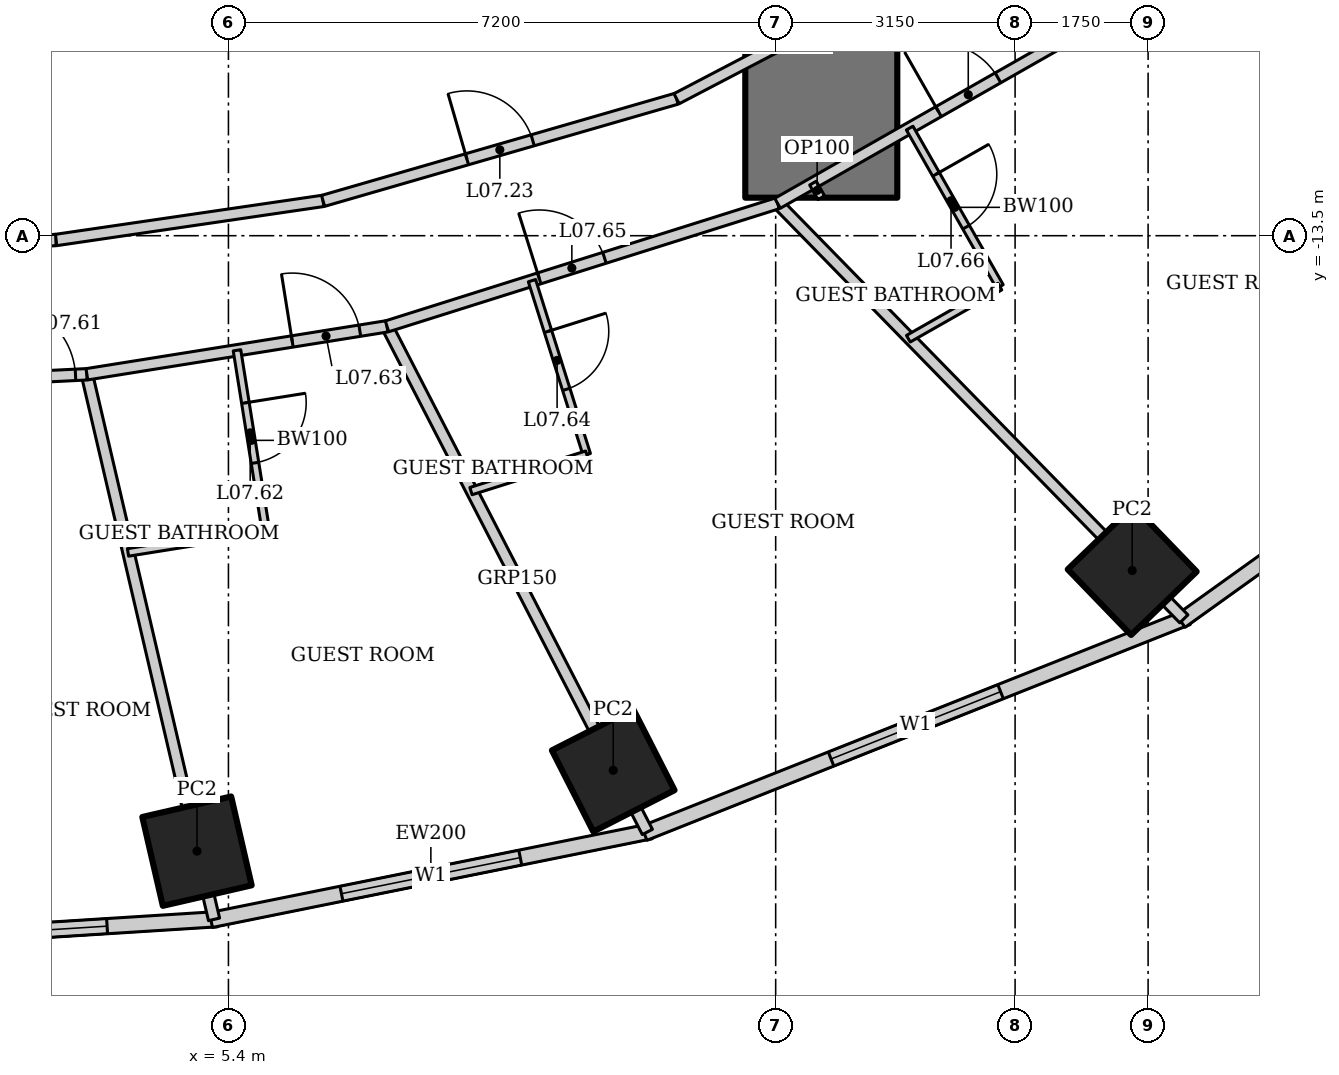
"""IFC4 building model, lengths in metres.
Left out: names, types, materials, properties, quantities, classifications, styles, units other than length and angle.
Written with IfcOpenShell. Run it as: python <this file> out.ifc"""

import sys

from ifc_helpers import new_model, si_unit, direction, frame, frame_2d, origin, origin_2d, place, context, subcontext, project, spatial, rectangle, hollow_rectangle, extrude, element, fill, save


model = new_model("IFC4")
c1 = context("Model", 3, precision=1e-05, world=origin(), true_north=direction((0.0, 1.0)))
c2 = subcontext(c1, "Body", "Model", "MODEL_VIEW")
j1 = project(units=[si_unit("LENGTHUNIT", "METRE"), si_unit("PLANEANGLEUNIT", "RADIAN")], contexts=[c1])
p1 = place(None, origin())
s1 = spatial("IfcSite", under=j1, at=p1, CompositionType="ELEMENT")
p2 = place(p1, origin())
s2 = spatial("IfcBuilding", under=s1, at=p2, CompositionType="ELEMENT")
p3 = place(p2, frame((0.0, 0.0, 40.6)))
s3 = spatial("IfcBuildingStorey", under=s2, at=p3, CompositionType="ELEMENT", Elevation=40.6)
for number, where, z_axis, x_axis in (
    (1, (4.986, -21.598, 0.0), (0.0, 0.0, 1.0), (0.974, 0.225, 0.0)),
    (2, (10.463, -20.534, 0.0), (0.0, 0.0, 1.0), (0.891, 0.454, 0.0)),
    (3, (17.291, -17.905, 0.0), (0.0, 0.0, 1.0), (0.719, 0.695, 0.0)),
):
    element("IfcColumn", number, at=place(p3, frame(where, z_axis=z_axis, x_axis=x_axis)), inside=s3, PredefinedType="COLUMN", context=c2, shape_type="SweptSolid", body=[
        extrude(hollow_rectangle(XDim=1.2, YDim=1.2, WallThickness=0.1, at=origin_2d()), origin(), (0.0, 0.0, 1.0), 3.6),
    ])
p4 = place(p3, frame((13.2, -13.0, 0.0), z_axis=(0.0, 0.0, 1.0), x_axis=(0.0, 1.0, 0.0)))
e4 = element("IfcWall", 4, at=p4, inside=s3, PredefinedType="SHEAR", context=c2, shape_type="SweptSolid", body=[
    extrude(rectangle(XDim=26.0, YDim=2.0, at=frame_2d((13.0, 0.0))), origin(), (0.0, 0.0, 1.0), 3.6),
])
p5 = place(p4, frame((12.1, 0.0, 0.0)))
e5 = element("IfcOpeningElement", 5, at=p5, cuts=e4, PredefinedType="OPENING", context=c2, shape_type="SweptSolid", body=[
    extrude(rectangle(XDim=1.8, YDim=2.1, at=frame_2d((0.9, 1.05))), frame((0.0, 1.01, 0.0), z_axis=(0.0, -1.0, 0.0), x_axis=(1.0, 0.0, 0.0)), (0.0, 0.0, 1.0), 2.02),
])
p6 = place(p3, frame((-0.041, -22.827, 0.0), z_axis=(0.0, 0.0, 1.0), x_axis=(0.998018582375, 0.062919863585, 0.0)))
e6 = element("IfcWall", 6, at=p6, inside=s3, PredefinedType="SOLIDWALL", context=c2, shape_type="SweptSolid", body=[
    extrude(rectangle(XDim=5.304, YDim=0.2, at=frame_2d((2.652, 0.0))), origin(), (0.0, 0.0, 1.0), 3.45),
])
p7 = place(p6, frame((1.452, 0.0, 0.5)))
e7 = element("IfcOpeningElement", 7, at=p7, cuts=e6, PredefinedType="OPENING", context=c2, shape_type="SweptSolid", body=[
    extrude(rectangle(XDim=2.4, YDim=2.2, at=frame_2d((1.2, 1.1))), frame((0.0, 0.11, 0.0), z_axis=(0.0, -1.0, 0.0), x_axis=(1.0, 0.0, 0.0)), (0.0, 0.0, 1.0), 0.22),
])
p8 = place(p3, frame((5.17, -22.504, 0.0), z_axis=(0.0, 0.0, 1.0), x_axis=(0.980251657452, 0.197754110105, 0.0)))
e8 = element("IfcWall", 8, at=p8, inside=s3, PredefinedType="SOLIDWALL", context=c2, shape_type="SweptSolid", body=[
    extrude(rectangle(XDim=5.904, YDim=0.2, at=frame_2d((2.952, 0.0))), origin(), (0.0, 0.0, 1.0), 3.45),
])
p9 = place(p8, frame((1.752, 0.0, 0.5)))
e9 = element("IfcOpeningElement", 9, at=p9, cuts=e8, PredefinedType="OPENING", context=c2, shape_type="SweptSolid", body=[
    extrude(rectangle(XDim=2.4, YDim=2.2, at=frame_2d((1.2, 1.1))), frame((0.0, 0.11, 0.0), z_axis=(0.0, -1.0, 0.0), x_axis=(1.0, 0.0, 0.0)), (0.0, 0.0, 1.0), 0.22),
])
p10 = place(p3, frame((10.869, -21.363, 0.0), z_axis=(0.0, 0.0, 1.0), x_axis=(0.929358351251, 0.369178892895, 0.0)))
e10 = element("IfcWall", 10, at=p10, inside=s3, PredefinedType="SOLIDWALL", context=c2, shape_type="SweptSolid", body=[
    extrude(rectangle(XDim=7.692, YDim=0.2, at=frame_2d((3.846, 0.0))), origin(), (0.0, 0.0, 1.0), 3.45),
])
p11 = place(p10, frame((2.646, 0.0, 0.5)))
e11 = element("IfcOpeningElement", 11, at=p11, cuts=e10, PredefinedType="OPENING", context=c2, shape_type="SweptSolid", body=[
    extrude(rectangle(XDim=2.4, YDim=2.2, at=frame_2d((1.2, 1.1))), frame((0.0, 0.11, 0.0), z_axis=(0.0, -1.0, 0.0), x_axis=(1.0, 0.0, 0.0)), (0.0, 0.0, 1.0), 0.22),
])
p12 = place(p3, frame((17.929, -18.572, 0.0), z_axis=(0.0, 0.0, 1.0), x_axis=(0.812791321576, 0.582554948112, 0.0)))
e12 = element("IfcWall", 12, at=p12, inside=s3, PredefinedType="SOLIDWALL", context=c2, shape_type="SweptSolid", body=[
    extrude(rectangle(XDim=8.063, YDim=0.2, at=frame_2d((4.032, 0.0))), origin(), (0.0, 0.0, 1.0), 3.45),
])
p13 = place(p12, frame((2.832, 0.0, 0.5)))
e13 = element("IfcOpeningElement", 13, at=p13, cuts=e12, PredefinedType="OPENING", context=c2, shape_type="SweptSolid", body=[
    extrude(rectangle(XDim=2.4, YDim=2.2, at=frame_2d((1.2, 1.1))), frame((0.0, 0.11, 0.0), z_axis=(0.0, -1.0, 0.0), x_axis=(1.0, 0.0, 0.0)), (0.0, 0.0, 1.0), 0.22),
])
p14 = place(p3, frame((5.211, -22.496, 0.0), z_axis=(0.0, 0.0, 1.0), x_axis=(-0.227195035564, 0.973849277771, 0.0)))
e14 = element("IfcWall", 14, at=p14, inside=s3, PredefinedType="PARTITIONING", context=c2, shape_type="SweptSolid", body=[
    extrude(rectangle(XDim=7.365, YDim=0.15, at=frame_2d((3.683, 0.0))), origin(), (0.0, 0.0, 1.0), 2.767),
])
p15 = place(p3, frame((10.912, -21.346, 0.0), z_axis=(0.0, 0.0, 1.0), x_axis=(-0.45777845119, 0.889066302154, 0.0)))
e15 = element("IfcWall", 15, at=p15, inside=s3, PredefinedType="PARTITIONING", context=c2, shape_type="SweptSolid", body=[
    extrude(rectangle(XDim=7.483, YDim=0.15, at=frame_2d((3.742, 0.0))), origin(), (0.0, 0.0, 1.0), 2.528),
])
p16 = place(p3, frame((17.97, -18.542, 0.0), z_axis=(0.0, 0.0, 1.0), x_axis=(-0.699032031211, 0.715090357467, 0.0)))
e16 = element("IfcWall", 16, at=p16, inside=s3, PredefinedType="PARTITIONING", context=c2, shape_type="SweptSolid", body=[
    extrude(rectangle(XDim=7.647, YDim=0.15, at=frame_2d((3.824, 0.0))), origin(), (0.0, 0.0, 1.0), 2.528),
])
p17 = place(p3, frame((24.435, -13.909, 0.0), z_axis=(0.0, 0.0, 1.0), x_axis=(-0.871267209855, 0.490808974074, 0.0)))
e17 = element("IfcWall", 17, at=p17, inside=s3, PredefinedType="PARTITIONING", context=c2, shape_type="SweptSolid", body=[
    extrude(rectangle(XDim=7.659, YDim=0.15, at=frame_2d((3.83, 0.0))), origin(), (0.0, 0.0, 1.0), 2.693),
])
p18 = place(p3, frame((0.0, -15.5, 0.0), z_axis=(0.0, 0.0, 1.0), x_axis=(0.998754057167, 0.049903239295, 0.0)))
e18 = element("IfcWall", 18, at=p18, inside=s3, PredefinedType="PARTITIONING", context=c2, shape_type="SweptSolid", body=[
    extrude(rectangle(XDim=3.542, YDim=0.15, at=frame_2d((1.771, 0.0))), origin(), (0.0, 0.0, 1.0), 3.45),
])
p19 = place(p18, frame((2.392, 0.0, 0.0)))
e19 = element("IfcOpeningElement", 19, at=p19, cuts=e18, PredefinedType="OPENING", context=c2, shape_type="SweptSolid", body=[
    extrude(rectangle(XDim=1.0, YDim=2.1, at=frame_2d((0.5, 1.05))), frame((0.0, 0.085, 0.0), z_axis=(0.0, -1.0, 0.0), x_axis=(1.0, 0.0, 0.0)), (0.0, 0.0, 1.0), 0.17),
])
p20 = place(p3, frame((3.538, -15.323, 0.0), z_axis=(0.0, 0.0, 1.0), x_axis=(0.987475660646, 0.157771415761, 0.0)))
e20 = element("IfcWall", 20, at=p20, inside=s3, PredefinedType="PARTITIONING", context=c2, shape_type="SweptSolid", body=[
    extrude(rectangle(XDim=3.999, YDim=0.15, at=frame_2d((1.999, 0.0))), origin(), (0.0, 0.0, 1.0), 3.45),
])
p21 = place(p20, frame((2.736, 0.0, 0.0)))
e21 = element("IfcOpeningElement", 21, at=p21, cuts=e20, PredefinedType="OPENING", context=c2, shape_type="SweptSolid", body=[
    extrude(rectangle(XDim=0.9, YDim=2.1, at=frame_2d((0.45, 1.05))), frame((0.0, 0.085, 0.0), z_axis=(0.0, -1.0, 0.0), x_axis=(1.0, 0.0, 0.0)), (0.0, 0.0, 1.0), 0.17),
])
p22 = place(p3, frame((7.486, -14.692, 0.0), z_axis=(0.0, 0.0, 1.0), x_axis=(0.953774229808, 0.30052407317, 0.0)))
e22 = element("IfcWall", 22, at=p22, inside=s3, PredefinedType="PARTITIONING", context=c2, shape_type="SweptSolid", body=[
    extrude(rectangle(XDim=5.388, YDim=0.15, at=frame_2d((2.694, 0.0))), origin(), (0.0, 0.0, 1.0), 3.45),
])
p23 = place(p22, frame((2.1, 0.0, 0.0)))
e23 = element("IfcOpeningElement", 23, at=p23, cuts=e22, PredefinedType="OPENING", context=c2, shape_type="SweptSolid", body=[
    extrude(rectangle(XDim=0.9, YDim=2.1, at=frame_2d((0.45, 1.05))), frame((0.0, 0.085, 0.0), z_axis=(0.0, -1.0, 0.0), x_axis=(1.0, 0.0, 0.0)), (0.0, 0.0, 1.0), 0.17),
])
p24 = place(p3, frame((12.625, -13.073, 0.0), z_axis=(0.0, 0.0, 1.0), x_axis=(0.86907565943, 0.494679187136, 0.0)))
e24 = element("IfcWall", 24, at=p24, inside=s3, PredefinedType="PARTITIONING", context=c2, shape_type="SweptSolid", body=[
    extrude(rectangle(XDim=5.911, YDim=0.15, at=frame_2d((2.955, 0.0))), origin(), (0.0, 0.0, 1.0), 3.45),
])
p25 = place(p24, frame((2.437, 0.0, 0.0)))
e25 = element("IfcOpeningElement", 25, at=p25, cuts=e24, PredefinedType="OPENING", context=c2, shape_type="SweptSolid", body=[
    extrude(rectangle(XDim=0.9, YDim=2.1, at=frame_2d((0.45, 1.05))), frame((0.0, 0.085, 0.0), z_axis=(0.0, -1.0, 0.0), x_axis=(1.0, 0.0, 0.0)), (0.0, 0.0, 1.0), 0.17),
])
p26 = place(p3, frame((3.13, -13.557, 0.0), z_axis=(0.0, 0.0, 1.0), x_axis=(0.989443047021, 0.14492224364, 0.0)))
e26 = element("IfcWall", 26, at=p26, inside=s3, PredefinedType="PARTITIONING", context=c2, shape_type="SweptSolid", body=[
    extrude(rectangle(XDim=3.553, YDim=0.15, at=frame_2d((1.776, 0.0))), origin(), (0.0, 0.0, 1.0), 3.45),
])
p27 = place(p3, frame((6.645, -13.042, 0.0), z_axis=(0.0, 0.0, 1.0), x_axis=(0.960678318068, 0.277663770041, 0.0)))
e27 = element("IfcWall", 27, at=p27, inside=s3, PredefinedType="PARTITIONING", context=c2, shape_type="SweptSolid", body=[
    extrude(rectangle(XDim=4.841, YDim=0.15, at=frame_2d((2.421, 0.0))), origin(), (0.0, 0.0, 1.0), 3.45),
])
p28 = place(p27, frame((1.971, 0.0, 0.0)))
e28 = element("IfcOpeningElement", 28, at=p28, cuts=e27, PredefinedType="OPENING", context=c2, shape_type="SweptSolid", body=[
    extrude(rectangle(XDim=0.9, YDim=2.1, at=frame_2d((0.45, 1.05))), frame((0.0, 0.085, 0.0), z_axis=(0.0, -1.0, 0.0), x_axis=(1.0, 0.0, 0.0)), (0.0, 0.0, 1.0), 0.17),
])
p29 = place(p3, frame((5.513, -15.008, 0.0), z_axis=(0.0, 0.0, 1.0), x_axis=(0.157780217218, -0.987474254376, 0.0)))
e29 = element("IfcWall", 29, at=p29, inside=s3, PredefinedType="PARTITIONING", context=c2, shape_type="SweptSolid", body=[
    extrude(rectangle(XDim=2.4, YDim=0.1, at=frame_2d((1.2, 0.0))), origin(), (0.0, 0.0, 1.0), 3.45),
])
p30 = place(p29, frame((0.7, 0.0, 0.0)))
e30 = element("IfcOpeningElement", 30, at=p30, cuts=e29, PredefinedType="OPENING", context=c2, shape_type="SweptSolid", body=[
    extrude(rectangle(XDim=0.8, YDim=2.1, at=frame_2d((0.4, 1.05))), frame((0.0, 0.06, 0.0), z_axis=(0.0, -1.0, 0.0), x_axis=(1.0, 0.0, 0.0)), (0.0, 0.0, 1.0), 0.12),
])
p31 = place(p3, frame((5.891, -17.378, 0.0), z_axis=(0.0, 0.0, 1.0), x_axis=(-0.987478784284, -0.157751863976, 0.0)))
e31 = element("IfcWall", 31, at=p31, inside=s3, PredefinedType="PARTITIONING", context=c2, shape_type="SweptSolid", body=[
    extrude(rectangle(XDim=1.835, YDim=0.1, at=frame_2d((0.918, 0.0))), origin(), (0.0, 0.0, 1.0), 3.45),
])
p32 = place(p3, frame((9.394, -14.091, 0.0), z_axis=(0.0, 0.0, 1.0), x_axis=(0.30049839721, -0.953782319649, 0.0)))
e32 = element("IfcWall", 32, at=p32, inside=s3, PredefinedType="PARTITIONING", context=c2, shape_type="SweptSolid", body=[
    extrude(rectangle(XDim=2.4, YDim=0.1, at=frame_2d((1.2, 0.0))), origin(), (0.0, 0.0, 1.0), 3.45),
])
p33 = place(p32, frame((0.7, 0.0, 0.0)))
e33 = element("IfcOpeningElement", 33, at=p33, cuts=e32, PredefinedType="OPENING", context=c2, shape_type="SweptSolid", body=[
    extrude(rectangle(XDim=0.8, YDim=2.1, at=frame_2d((0.4, 1.05))), frame((0.0, 0.06, 0.0), z_axis=(0.0, -1.0, 0.0), x_axis=(1.0, 0.0, 0.0)), (0.0, 0.0, 1.0), 0.12),
])
p34 = place(p3, frame((10.115, -16.38, 0.0), z_axis=(0.0, 0.0, 1.0), x_axis=(-0.953764923986, -0.300553605492, 0.0)))
e34 = element("IfcWall", 34, at=p34, inside=s3, PredefinedType="PARTITIONING", context=c2, shape_type="SweptSolid", body=[
    extrude(rectangle(XDim=1.598, YDim=0.1, at=frame_2d((0.799, 0.0))), origin(), (0.0, 0.0, 1.0), 3.45),
])
p35 = place(p3, frame((14.363, -12.084, 0.0), z_axis=(0.0, 0.0, 1.0), x_axis=(0.494703113698, -0.869062039959, 0.0)))
e35 = element("IfcWall", 35, at=p35, inside=s3, PredefinedType="PARTITIONING", context=c2, shape_type="SweptSolid", body=[
    extrude(rectangle(XDim=2.4, YDim=0.1, at=frame_2d((1.2, 0.0))), origin(), (0.0, 0.0, 1.0), 3.45),
])
p36 = place(p35, frame((0.7, 0.0, 0.0)))
e36 = element("IfcOpeningElement", 36, at=p36, cuts=e35, PredefinedType="OPENING", context=c2, shape_type="SweptSolid", body=[
    extrude(rectangle(XDim=0.8, YDim=2.1, at=frame_2d((0.4, 1.05))), frame((0.0, 0.06, 0.0), z_axis=(0.0, -1.0, 0.0), x_axis=(1.0, 0.0, 0.0)), (0.0, 0.0, 1.0), 0.12),
])
p37 = place(p3, frame((15.55, -14.17, 0.0), z_axis=(0.0, 0.0, 1.0), x_axis=(-0.869065896633, -0.494696338485, 0.0)))
e37 = element("IfcWall", 37, at=p37, inside=s3, PredefinedType="PARTITIONING", context=c2, shape_type="SweptSolid", body=[
    extrude(rectangle(XDim=1.386, YDim=0.1, at=frame_2d((0.693, 0.0))), origin(), (0.0, 0.0, 1.0), 3.45),
])
p38 = place(p3, frame((13.2, -13.0, 0.0), z_axis=(0.0, 0.0, 1.0), x_axis=(-0.49435138335, 0.869262164011, 0.0)))
e38 = element("IfcWall", 38, at=p38, inside=s3, PredefinedType="PARTITIONING", context=c2, shape_type="SweptSolid", body=[
    extrude(rectangle(XDim=0.221, YDim=0.1, at=frame_2d((0.11, 0.0))), origin(), (0.0, 0.0, 1.0), 3.45),
])
p39 = place(p3, frame((2.035, -13.607, 0.0), z_axis=(0.0, 0.0, 1.0), x_axis=(0.998946843147, 0.045882508292, 0.0)))
e39 = element("IfcWall", 39, at=p39, inside=s3, PredefinedType="PARTITIONING", context=c2, shape_type="SweptSolid", body=[
    extrude(rectangle(XDim=1.096, YDim=0.15, at=frame_2d((0.548, 0.0))), origin(), (0.0, 0.0, 1.0), 3.45),
])
p40 = place(p3, frame((11.296, -11.698, 0.0), z_axis=(0.0, 0.0, 1.0), x_axis=(0.886283344337, 0.463143426544, 0.0)))
e40 = element("IfcWall", 40, at=p40, inside=s3, PredefinedType="PARTITIONING", context=c2, shape_type="SweptSolid", body=[
    extrude(rectangle(XDim=3.265, YDim=0.15, at=frame_2d((1.633, 0.0))), origin(), (0.0, 0.0, 1.0), 3.45),
])
p41 = place(p7, origin())
e41 = element("IfcWindow", 41, at=p41, inside=s3, PartitioningType="SINGLE_PANEL", PredefinedType="WINDOW", context=c2, shape_type="SweptSolid", body=[
    extrude(rectangle(XDim=2.4, YDim=2.2, at=frame_2d((1.2, 1.1))), frame((0.0, 0.03, 0.0), z_axis=(0.0, -1.0, 0.0), x_axis=(1.0, 0.0, 0.0)), (0.0, 0.0, 1.0), 0.06),
])
fill(e7, e41)
p42 = place(p9, origin())
e42 = element("IfcWindow", 42, at=p42, inside=s3, PartitioningType="SINGLE_PANEL", PredefinedType="WINDOW", context=c2, shape_type="SweptSolid", body=[
    extrude(rectangle(XDim=2.4, YDim=2.2, at=frame_2d((1.2, 1.1))), frame((0.0, 0.03, 0.0), z_axis=(0.0, -1.0, 0.0), x_axis=(1.0, 0.0, 0.0)), (0.0, 0.0, 1.0), 0.06),
])
fill(e9, e42)
p43 = place(p11, origin())
e43 = element("IfcWindow", 43, at=p43, inside=s3, PartitioningType="SINGLE_PANEL", PredefinedType="WINDOW", context=c2, shape_type="SweptSolid", body=[
    extrude(rectangle(XDim=2.4, YDim=2.2, at=frame_2d((1.2, 1.1))), frame((0.0, 0.03, 0.0), z_axis=(0.0, -1.0, 0.0), x_axis=(1.0, 0.0, 0.0)), (0.0, 0.0, 1.0), 0.06),
])
fill(e11, e43)
p44 = place(p28, origin())
e44 = element("IfcDoor", 44, at=p44, inside=s3, OperationType="SINGLE_SWING_LEFT", PredefinedType="DOOR", context=c2, shape_type="SweptSolid", body=[
    extrude(rectangle(XDim=0.9, YDim=2.1, at=frame_2d((0.45, 1.05))), frame((0.0, 0.025, 0.0), z_axis=(0.0, -1.0, 0.0), x_axis=(1.0, 0.0, 0.0)), (0.0, 0.0, 1.0), 0.05),
])
fill(e28, e44)
p45 = place(p19, origin())
e45 = element("IfcDoor", 45, at=p45, inside=s3, OperationType="SINGLE_SWING_LEFT", PredefinedType="DOOR", context=c2, shape_type="SweptSolid", body=[
    extrude(rectangle(XDim=1.0, YDim=2.1, at=frame_2d((0.5, 1.05))), frame((0.0, 0.025, 0.0), z_axis=(0.0, -1.0, 0.0), x_axis=(1.0, 0.0, 0.0)), (0.0, 0.0, 1.0), 0.05),
])
fill(e19, e45)
p46 = place(p30, origin())
e46 = element("IfcDoor", 46, at=p46, inside=s3, OperationType="SINGLE_SWING_LEFT", PredefinedType="DOOR", context=c2, shape_type="SweptSolid", body=[
    extrude(rectangle(XDim=0.8, YDim=2.1, at=frame_2d((0.4, 1.05))), frame((0.0, 0.025, 0.0), z_axis=(0.0, -1.0, 0.0), x_axis=(1.0, 0.0, 0.0)), (0.0, 0.0, 1.0), 0.05),
])
fill(e30, e46)
p47 = place(p21, origin())
e47 = element("IfcDoor", 47, at=p47, inside=s3, OperationType="SINGLE_SWING_LEFT", PredefinedType="DOOR", context=c2, shape_type="SweptSolid", body=[
    extrude(rectangle(XDim=0.9, YDim=2.1, at=frame_2d((0.45, 1.05))), frame((0.0, 0.025, 0.0), z_axis=(0.0, -1.0, 0.0), x_axis=(1.0, 0.0, 0.0)), (0.0, 0.0, 1.0), 0.05),
])
fill(e21, e47)
p48 = place(p33, origin())
e48 = element("IfcDoor", 48, at=p48, inside=s3, OperationType="SINGLE_SWING_LEFT", PredefinedType="DOOR", context=c2, shape_type="SweptSolid", body=[
    extrude(rectangle(XDim=0.8, YDim=2.1, at=frame_2d((0.4, 1.05))), frame((0.0, 0.025, 0.0), z_axis=(0.0, -1.0, 0.0), x_axis=(1.0, 0.0, 0.0)), (0.0, 0.0, 1.0), 0.05),
])
fill(e33, e48)
p49 = place(p23, origin())
e49 = element("IfcDoor", 49, at=p49, inside=s3, OperationType="SINGLE_SWING_LEFT", PredefinedType="DOOR", context=c2, shape_type="SweptSolid", body=[
    extrude(rectangle(XDim=0.9, YDim=2.1, at=frame_2d((0.45, 1.05))), frame((0.0, 0.025, 0.0), z_axis=(0.0, -1.0, 0.0), x_axis=(1.0, 0.0, 0.0)), (0.0, 0.0, 1.0), 0.05),
])
fill(e23, e49)
p50 = place(p36, origin())
e50 = element("IfcDoor", 50, at=p50, inside=s3, OperationType="SINGLE_SWING_LEFT", PredefinedType="DOOR", context=c2, shape_type="SweptSolid", body=[
    extrude(rectangle(XDim=0.8, YDim=2.1, at=frame_2d((0.4, 1.05))), frame((0.0, 0.025, 0.0), z_axis=(0.0, -1.0, 0.0), x_axis=(1.0, 0.0, 0.0)), (0.0, 0.0, 1.0), 0.05),
])
fill(e36, e50)
p51 = place(p25, origin())
e51 = element("IfcDoor", 51, at=p51, inside=s3, OperationType="SINGLE_SWING_LEFT", PredefinedType="DOOR", context=c2, shape_type="SweptSolid", body=[
    extrude(rectangle(XDim=0.9, YDim=2.1, at=frame_2d((0.45, 1.05))), frame((0.0, 0.025, 0.0), z_axis=(0.0, -1.0, 0.0), x_axis=(1.0, 0.0, 0.0)), (0.0, 0.0, 1.0), 0.05),
])
fill(e25, e51)
save(model, sys.argv[1])
